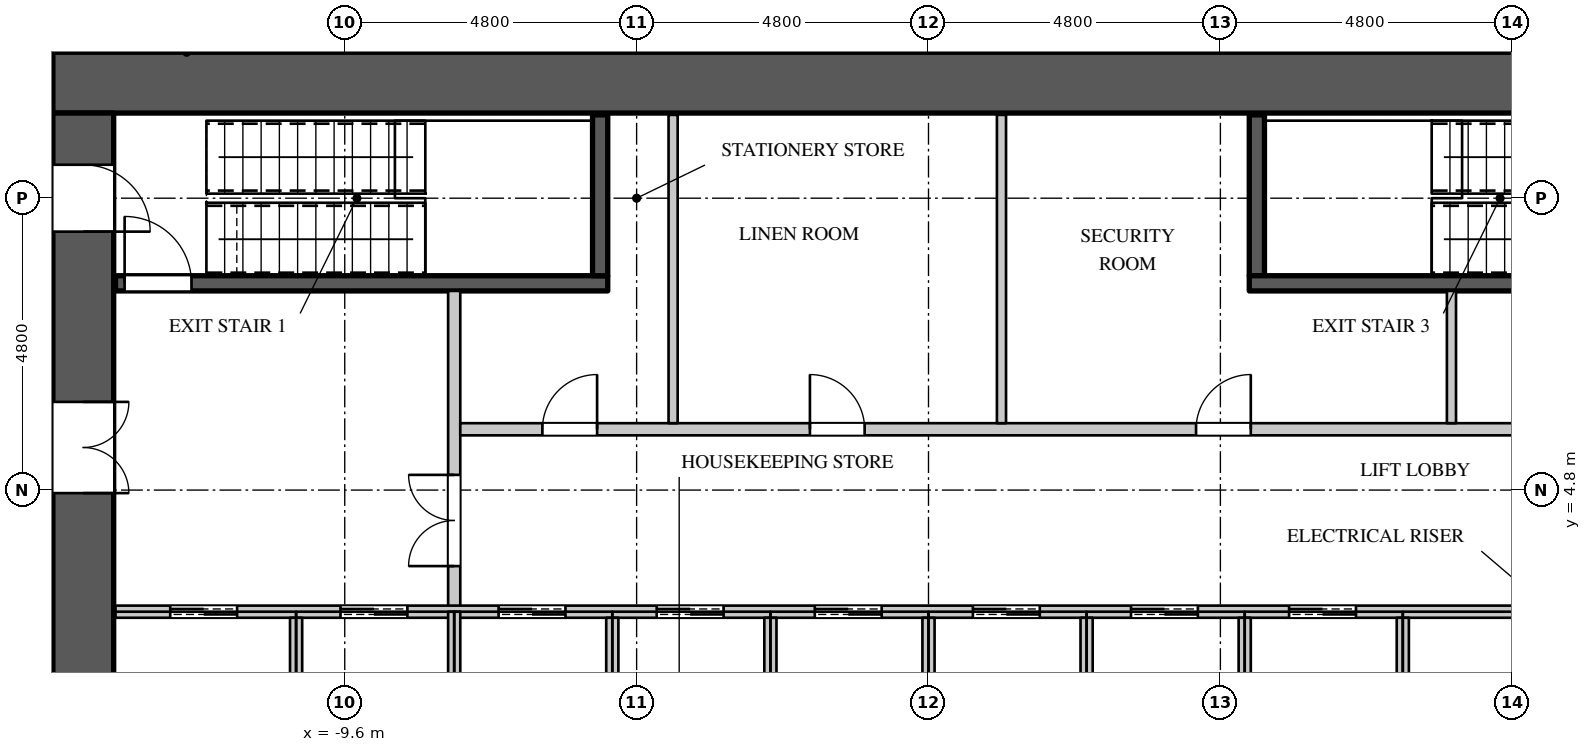
"""IFC4 building model, lengths in metres.
Left out: names, types, materials, properties, quantities, classifications, styles, units other than length and angle.
Written with IfcOpenShell. Run it as: python <this file> out.ifc"""

import sys

from ifc_helpers import new_model, si_unit, direction, frame, frame_2d, origin, place, context, subcontext, project, spatial, rectangle, extrude, element, fill, save


model = new_model("IFC4")
c1 = context("Model", 3, precision=1e-05, world=origin(), true_north=direction((0.0, 1.0)))
c2 = subcontext(c1, "Body", "Model", "MODEL_VIEW")
j1 = project(units=[si_unit("LENGTHUNIT", "METRE"), si_unit("PLANEANGLEUNIT", "RADIAN")], contexts=[c1])
p1 = place(None, origin())
s1 = spatial("IfcSite", under=j1, at=p1, CompositionType="ELEMENT")
p2 = place(p1, origin())
s2 = spatial("IfcBuilding", under=s1, at=p2, CompositionType="ELEMENT")
p3 = place(p2, frame((0.0, 0.0, 71.7)))
s3 = spatial("IfcBuildingStorey", under=s2, at=p3, CompositionType="ELEMENT", Elevation=71.7)
p4 = place(p3, frame((-14.4, 11.5, 0.0), z_axis=(0.0, 0.0, 1.0), x_axis=(1.0, 0.0, 0.0)))
e1 = element("IfcWall", 1, at=p4, inside=s3, PredefinedType="SHEAR", context=c2, shape_type="SweptSolid", body=[
    extrude(rectangle(XDim=28.8, YDim=1.0, at=frame_2d((14.4, 0.0))), origin(), (0.0, 0.0, 1.0), 4.2),
])
p5 = place(p3, frame((-13.9, -11.0, 0.0), z_axis=(0.0, 0.0, 1.0), x_axis=(0.0, 1.0, 0.0)))
e2 = element("IfcWall", 2, at=p5, inside=s3, PredefinedType="SHEAR", context=c2, shape_type="SweptSolid", body=[
    extrude(rectangle(XDim=22.0, YDim=1.0, at=frame_2d((11.0, 0.0))), origin(), (0.0, 0.0, 1.0), 4.2),
])
p6 = place(p5, frame((20.05, 0.0, 0.0)))
e3 = element("IfcOpeningElement", 3, at=p6, cuts=e2, PredefinedType="OPENING", context=c2, shape_type="SweptSolid", body=[
    extrude(rectangle(XDim=1.1, YDim=2.2, at=frame_2d((0.55, 1.1))), frame((0.0, 0.51, 0.0), z_axis=(0.0, -1.0, 0.0), x_axis=(1.0, 0.0, 0.0)), (0.0, 0.0, 1.0), 1.02),
])
p7 = place(p5, frame((0.85, 0.0, 0.0)))
e4 = element("IfcOpeningElement", 4, at=p7, cuts=e2, PredefinedType="OPENING", context=c2, shape_type="SweptSolid", body=[
    extrude(rectangle(XDim=1.1, YDim=2.2, at=frame_2d((0.55, 1.1))), frame((0.0, 0.51, 0.0), z_axis=(0.0, -1.0, 0.0), x_axis=(1.0, 0.0, 0.0)), (0.0, 0.0, 1.0), 1.02),
])
p8 = place(p5, frame((15.75, 0.0, 0.0)))
e5 = element("IfcOpeningElement", 5, at=p8, cuts=e2, PredefinedType="OPENING", context=c2, shape_type="SweptSolid", body=[
    extrude(rectangle(XDim=1.5, YDim=2.4, at=frame_2d((0.75, 1.2))), frame((0.0, 0.51, 0.0), z_axis=(0.0, -1.0, 0.0), x_axis=(1.0, 0.0, 0.0)), (0.0, 0.0, 1.0), 1.02),
])
p9 = place(p5, frame((4.75, 0.0, 0.0)))
e6 = element("IfcOpeningElement", 6, at=p9, cuts=e2, PredefinedType="OPENING", context=c2, shape_type="SweptSolid", body=[
    extrude(rectangle(XDim=1.5, YDim=2.4, at=frame_2d((0.75, 1.2))), frame((0.0, 0.51, 0.0), z_axis=(0.0, -1.0, 0.0), x_axis=(1.0, 0.0, 0.0)), (0.0, 0.0, 1.0), 1.02),
])
p10 = place(p3, frame((-7.8, 2.8, 0.0), z_axis=(0.0, 0.0, 1.0), x_axis=(0.0, 1.0, 0.0)))
e7 = element("IfcWall", 7, at=p10, inside=s3, PredefinedType="PARTITIONING", context=c2, shape_type="SweptSolid", body=[
    extrude(rectangle(XDim=5.275, YDim=0.2, at=frame_2d((2.637, 0.0))), origin(), (0.0, 0.0, 1.0), 3.95),
])
p11 = place(p10, frame((0.75, 0.0, 0.0)))
e8 = element("IfcOpeningElement", 8, at=p11, cuts=e7, PredefinedType="OPENING", context=c2, shape_type="SweptSolid", body=[
    extrude(rectangle(XDim=1.5, YDim=2.4, at=frame_2d((0.75, 1.2))), frame((0.0, 0.11, 0.0), z_axis=(0.0, -1.0, 0.0), x_axis=(1.0, 0.0, 0.0)), (0.0, 0.0, 1.0), 0.22),
])
p12 = place(p3, frame((-7.7, 5.8, 0.0), z_axis=(0.0, 0.0, 1.0), x_axis=(1.0, 0.0, 0.0)))
e9 = element("IfcWall", 9, at=p12, inside=s3, PredefinedType="PARTITIONING", context=c2, shape_type="SweptSolid", body=[
    extrude(rectangle(XDim=21.07, YDim=0.2, at=frame_2d((10.535, 0.0))), origin(), (0.0, 0.0, 1.0), 3.95),
])
p13 = place(p12, frame((1.35, 0.0, 0.0)))
e10 = element("IfcOpeningElement", 10, at=p13, cuts=e9, PredefinedType="OPENING", context=c2, shape_type="SweptSolid", body=[
    extrude(rectangle(XDim=0.9, YDim=2.2, at=frame_2d((0.45, 1.1))), frame((0.0, 0.11, 0.0), z_axis=(0.0, -1.0, 0.0), x_axis=(1.0, 0.0, 0.0)), (0.0, 0.0, 1.0), 0.22),
])
p14 = place(p12, frame((5.75, 0.0, 0.0)))
e11 = element("IfcOpeningElement", 11, at=p14, cuts=e9, PredefinedType="OPENING", context=c2, shape_type="SweptSolid", body=[
    extrude(rectangle(XDim=0.9, YDim=2.2, at=frame_2d((0.45, 1.1))), frame((0.0, 0.11, 0.0), z_axis=(0.0, -1.0, 0.0), x_axis=(1.0, 0.0, 0.0)), (0.0, 0.0, 1.0), 0.22),
])
p15 = place(p12, frame((12.1, 0.0, 0.0)))
e12 = element("IfcOpeningElement", 12, at=p15, cuts=e9, PredefinedType="OPENING", context=c2, shape_type="SweptSolid", body=[
    extrude(rectangle(XDim=0.9, YDim=2.2, at=frame_2d((0.45, 1.1))), frame((0.0, 0.11, 0.0), z_axis=(0.0, -1.0, 0.0), x_axis=(1.0, 0.0, 0.0)), (0.0, 0.0, 1.0), 0.22),
])
p16 = place(p12, frame((18.15, 0.0, 0.0)))
e13 = element("IfcOpeningElement", 13, at=p16, cuts=e9, PredefinedType="OPENING", context=c2, shape_type="SweptSolid", body=[
    extrude(rectangle(XDim=0.9, YDim=2.2, at=frame_2d((0.45, 1.1))), frame((0.0, 0.11, 0.0), z_axis=(0.0, -1.0, 0.0), x_axis=(1.0, 0.0, 0.0)), (0.0, 0.0, 1.0), 0.22),
])
for number, where, z_axis, x_axis in (
    (14, (-4.2, 5.9, 0.0), (0.0, 0.0, 1.0), (0.0, 1.0, 0.0)),
    (15, (1.2, 5.9, 0.0), (0.0, 0.0, 1.0), (0.0, 1.0, 0.0)),
):
    element("IfcWall", number, at=place(p3, frame(where, z_axis=z_axis, x_axis=x_axis)), inside=s3, PredefinedType="PARTITIONING", context=c2, shape_type="SweptSolid", body=[
        extrude(rectangle(XDim=5.07, YDim=0.15, at=frame_2d((2.535, 0.0))), origin(), (0.0, 0.0, 1.0), 3.95),
    ])
p17 = place(p3, frame((8.6, 5.9, 0.0), z_axis=(0.0, 0.0, 1.0), x_axis=(0.0, 1.0, 0.0)))
e16 = element("IfcWall", 16, at=p17, inside=s3, PredefinedType="PARTITIONING", context=c2, shape_type="SweptSolid", body=[
    extrude(rectangle(XDim=2.175, YDim=0.15, at=frame_2d((1.087, 0.0))), origin(), (0.0, 0.0, 1.0), 3.95),
])
p18 = place(p3, frame((-13.37, 2.8, 0.0), z_axis=(0.0, 0.0, 1.0), x_axis=(1.0, 0.0, 0.0)))
e17 = element("IfcWall", 17, at=p18, inside=s3, PredefinedType="PARTITIONING", context=c2, shape_type="SweptSolid", body=[
    extrude(rectangle(XDim=23.77, YDim=0.2, at=frame_2d((11.885, 0.0))), origin(), (0.0, 0.0, 1.0), 3.95),
])
p19 = place(p18, frame((0.9, 0.0, 0.0)))
e18 = element("IfcOpeningElement", 18, at=p19, cuts=e17, PredefinedType="OPENING", context=c2, shape_type="SweptSolid", body=[
    extrude(rectangle(XDim=1.1, YDim=2.2, at=frame_2d((0.55, 1.1))), frame((0.0, 0.11, 0.0), z_axis=(0.0, -1.0, 0.0), x_axis=(1.0, 0.0, 0.0)), (0.0, 0.0, 1.0), 0.22),
])
p20 = place(p18, frame((3.7, 0.0, 0.0)))
e19 = element("IfcOpeningElement", 19, at=p20, cuts=e17, PredefinedType="OPENING", context=c2, shape_type="SweptSolid", body=[
    extrude(rectangle(XDim=1.1, YDim=2.2, at=frame_2d((0.55, 1.1))), frame((0.0, 0.11, 0.0), z_axis=(0.0, -1.0, 0.0), x_axis=(1.0, 0.0, 0.0)), (0.0, 0.0, 1.0), 0.22),
])
p21 = place(p18, frame((6.3, 0.0, 0.0)))
e20 = element("IfcOpeningElement", 20, at=p21, cuts=e17, PredefinedType="OPENING", context=c2, shape_type="SweptSolid", body=[
    extrude(rectangle(XDim=1.1, YDim=2.2, at=frame_2d((0.55, 1.1))), frame((0.0, 0.11, 0.0), z_axis=(0.0, -1.0, 0.0), x_axis=(1.0, 0.0, 0.0)), (0.0, 0.0, 1.0), 0.22),
])
p22 = place(p18, frame((8.9, 0.0, 0.0)))
e21 = element("IfcOpeningElement", 21, at=p22, cuts=e17, PredefinedType="OPENING", context=c2, shape_type="SweptSolid", body=[
    extrude(rectangle(XDim=1.1, YDim=2.2, at=frame_2d((0.55, 1.1))), frame((0.0, 0.11, 0.0), z_axis=(0.0, -1.0, 0.0), x_axis=(1.0, 0.0, 0.0)), (0.0, 0.0, 1.0), 0.22),
])
p23 = place(p18, frame((11.5, 0.0, 0.0)))
e22 = element("IfcOpeningElement", 22, at=p23, cuts=e17, PredefinedType="OPENING", context=c2, shape_type="SweptSolid", body=[
    extrude(rectangle(XDim=1.1, YDim=2.2, at=frame_2d((0.55, 1.1))), frame((0.0, 0.11, 0.0), z_axis=(0.0, -1.0, 0.0), x_axis=(1.0, 0.0, 0.0)), (0.0, 0.0, 1.0), 0.22),
])
p24 = place(p18, frame((14.1, 0.0, 0.0)))
e23 = element("IfcOpeningElement", 23, at=p24, cuts=e17, PredefinedType="OPENING", context=c2, shape_type="SweptSolid", body=[
    extrude(rectangle(XDim=1.1, YDim=2.2, at=frame_2d((0.55, 1.1))), frame((0.0, 0.11, 0.0), z_axis=(0.0, -1.0, 0.0), x_axis=(1.0, 0.0, 0.0)), (0.0, 0.0, 1.0), 0.22),
])
p25 = place(p18, frame((16.7, 0.0, 0.0)))
e24 = element("IfcOpeningElement", 24, at=p25, cuts=e17, PredefinedType="OPENING", context=c2, shape_type="SweptSolid", body=[
    extrude(rectangle(XDim=1.1, YDim=2.2, at=frame_2d((0.55, 1.1))), frame((0.0, 0.11, 0.0), z_axis=(0.0, -1.0, 0.0), x_axis=(1.0, 0.0, 0.0)), (0.0, 0.0, 1.0), 0.22),
])
p26 = place(p18, frame((19.3, 0.0, 0.0)))
e25 = element("IfcOpeningElement", 25, at=p26, cuts=e17, PredefinedType="OPENING", context=c2, shape_type="SweptSolid", body=[
    extrude(rectangle(XDim=1.1, YDim=2.2, at=frame_2d((0.55, 1.1))), frame((0.0, 0.11, 0.0), z_axis=(0.0, -1.0, 0.0), x_axis=(1.0, 0.0, 0.0)), (0.0, 0.0, 1.0), 0.22),
])
p27 = place(p3, frame((-10.4, 0.0, 0.0), z_axis=(0.0, 0.0, 1.0), x_axis=(0.0, 1.0, 0.0)))
e26 = element("IfcWall", 26, at=p27, inside=s3, PredefinedType="PARTITIONING", context=c2, shape_type="SweptSolid", body=[
    extrude(rectangle(XDim=2.7, YDim=0.2, at=frame_2d((1.35, 0.0))), origin(), (0.0, 0.0, 1.0), 3.95),
])
p28 = place(p3, frame((-7.8, 0.0, 0.0), z_axis=(0.0, 0.0, 1.0), x_axis=(0.0, 1.0, 0.0)))
e27 = element("IfcWall", 27, at=p28, inside=s3, PredefinedType="PARTITIONING", context=c2, shape_type="SweptSolid", body=[
    extrude(rectangle(XDim=2.8, YDim=0.2, at=frame_2d((1.4, 0.0))), origin(), (0.0, 0.0, 1.0), 3.95),
])
for number, where, z_axis, x_axis in (
    (28, (-5.2, 0.1, 0.0), (0.0, 0.0, 1.0), (0.0, 1.0, 0.0)),
    (29, (-2.6, 0.1, 0.0), (0.0, 0.0, 1.0), (0.0, 1.0, 0.0)),
    (30, (0.0, 0.1, 0.0), (0.0, 0.0, 1.0), (0.0, 1.0, 0.0)),
    (31, (2.6, 0.1, 0.0), (0.0, 0.0, 1.0), (0.0, 1.0, 0.0)),
    (32, (5.2, 0.1, 0.0), (0.0, 0.0, 1.0), (0.0, 1.0, 0.0)),
):
    element("IfcWall", number, at=place(p3, frame(where, z_axis=z_axis, x_axis=x_axis)), inside=s3, PredefinedType="PARTITIONING", context=c2, shape_type="SweptSolid", body=[
        extrude(rectangle(XDim=2.6, YDim=0.2, at=frame_2d((1.3, 0.0))), origin(), (0.0, 0.0, 1.0), 3.95),
    ])
p29 = place(p3, frame((7.8, 0.0, 0.0), z_axis=(0.0, 0.0, 1.0), x_axis=(0.0, 1.0, 0.0)))
e33 = element("IfcWall", 33, at=p29, inside=s3, PredefinedType="PARTITIONING", context=c2, shape_type="SweptSolid", body=[
    extrude(rectangle(XDim=2.7, YDim=0.2, at=frame_2d((1.35, 0.0))), origin(), (0.0, 0.0, 1.0), 3.95),
])
p30 = place(p3, frame((-13.37, 8.2, 0.0), z_axis=(0.0, 0.0, 1.0), x_axis=(1.0, 0.0, 0.0)))
e34 = element("IfcWall", 34, at=p30, inside=s3, PredefinedType="SHEAR", context=c2, shape_type="SweptSolid", body=[
    extrude(rectangle(XDim=8.095, YDim=0.25, at=frame_2d((4.048, 0.0))), origin(), (0.0, 0.0, 1.0), 3.95),
])
p31 = place(p30, frame((0.15, 0.0, 0.0)))
e35 = element("IfcOpeningElement", 35, at=p31, cuts=e34, PredefinedType="OPENING", context=c2, shape_type="SweptSolid", body=[
    extrude(rectangle(XDim=1.1, YDim=2.2, at=frame_2d((0.55, 1.1))), frame((0.0, 0.135, 0.0), z_axis=(0.0, -1.0, 0.0), x_axis=(1.0, 0.0, 0.0)), (0.0, 0.0, 1.0), 0.27),
])
for number, where, z_axis, x_axis in (
    (36, (-5.4, 8.325, 0.0), (0.0, 0.0, 1.0), (0.0, 1.0, 0.0)),
    (37, (5.4, 8.325, 0.0), (0.0, 0.0, 1.0), (0.0, 1.0, 0.0)),
):
    element("IfcWall", number, at=place(p3, frame(where, z_axis=z_axis, x_axis=x_axis)), inside=s3, PredefinedType="SHEAR", context=c2, shape_type="SweptSolid", body=[
        extrude(rectangle(XDim=2.645, YDim=0.25, at=frame_2d((1.323, 0.0))), origin(), (0.0, 0.0, 1.0), 3.95),
    ])
p32 = place(p3, frame((5.275, 8.2, 0.0), z_axis=(0.0, 0.0, 1.0), x_axis=(1.0, 0.0, 0.0)))
e38 = element("IfcWall", 38, at=p32, inside=s3, PredefinedType="SHEAR", context=c2, shape_type="SweptSolid", body=[
    extrude(rectangle(XDim=8.095, YDim=0.25, at=frame_2d((4.048, 0.0))), origin(), (0.0, 0.0, 1.0), 3.95),
])
p33 = place(p13, origin())
e39 = element("IfcDoor", 39, at=p33, inside=s3, OperationType="SINGLE_SWING_RIGHT", PredefinedType="DOOR", context=c2, shape_type="SweptSolid", body=[
    extrude(rectangle(XDim=0.9, YDim=2.2, at=frame_2d((0.45, 1.1))), frame((0.0, 0.025, 0.0), z_axis=(0.0, -1.0, 0.0), x_axis=(1.0, 0.0, 0.0)), (0.0, 0.0, 1.0), 0.05),
])
fill(e10, e39)
p34 = place(p14, origin())
e40 = element("IfcDoor", 40, at=p34, inside=s3, OperationType="SINGLE_SWING_LEFT", PredefinedType="DOOR", context=c2, shape_type="SweptSolid", body=[
    extrude(rectangle(XDim=0.9, YDim=2.2, at=frame_2d((0.45, 1.1))), frame((0.0, 0.025, 0.0), z_axis=(0.0, -1.0, 0.0), x_axis=(1.0, 0.0, 0.0)), (0.0, 0.0, 1.0), 0.05),
])
fill(e11, e40)
p35 = place(p15, origin())
e41 = element("IfcDoor", 41, at=p35, inside=s3, OperationType="SINGLE_SWING_RIGHT", PredefinedType="DOOR", context=c2, shape_type="SweptSolid", body=[
    extrude(rectangle(XDim=0.9, YDim=2.2, at=frame_2d((0.45, 1.1))), frame((0.0, 0.025, 0.0), z_axis=(0.0, -1.0, 0.0), x_axis=(1.0, 0.0, 0.0)), (0.0, 0.0, 1.0), 0.05),
])
fill(e12, e41)
p36 = place(p19, origin())
e42 = element("IfcDoor", 42, at=p36, inside=s3, OperationType="DOUBLE_DOOR_SLIDING", PredefinedType="DOOR", context=c2, shape_type="SweptSolid", body=[
    extrude(rectangle(XDim=1.1, YDim=2.2, at=frame_2d((0.55, 1.1))), frame((0.0, 0.025, 0.0), z_axis=(0.0, -1.0, 0.0), x_axis=(1.0, 0.0, 0.0)), (0.0, 0.0, 1.0), 0.05),
])
fill(e18, e42)
p37 = place(p20, origin())
e43 = element("IfcDoor", 43, at=p37, inside=s3, OperationType="DOUBLE_DOOR_SLIDING", PredefinedType="DOOR", context=c2, shape_type="SweptSolid", body=[
    extrude(rectangle(XDim=1.1, YDim=2.2, at=frame_2d((0.55, 1.1))), frame((0.0, 0.025, 0.0), z_axis=(0.0, -1.0, 0.0), x_axis=(1.0, 0.0, 0.0)), (0.0, 0.0, 1.0), 0.05),
])
fill(e19, e43)
p38 = place(p21, origin())
e44 = element("IfcDoor", 44, at=p38, inside=s3, OperationType="DOUBLE_DOOR_SLIDING", PredefinedType="DOOR", context=c2, shape_type="SweptSolid", body=[
    extrude(rectangle(XDim=1.1, YDim=2.2, at=frame_2d((0.55, 1.1))), frame((0.0, 0.025, 0.0), z_axis=(0.0, -1.0, 0.0), x_axis=(1.0, 0.0, 0.0)), (0.0, 0.0, 1.0), 0.05),
])
fill(e20, e44)
p39 = place(p22, origin())
e45 = element("IfcDoor", 45, at=p39, inside=s3, OperationType="DOUBLE_DOOR_SLIDING", PredefinedType="DOOR", context=c2, shape_type="SweptSolid", body=[
    extrude(rectangle(XDim=1.1, YDim=2.2, at=frame_2d((0.55, 1.1))), frame((0.0, 0.025, 0.0), z_axis=(0.0, -1.0, 0.0), x_axis=(1.0, 0.0, 0.0)), (0.0, 0.0, 1.0), 0.05),
])
fill(e21, e45)
p40 = place(p23, origin())
e46 = element("IfcDoor", 46, at=p40, inside=s3, OperationType="DOUBLE_DOOR_SLIDING", PredefinedType="DOOR", context=c2, shape_type="SweptSolid", body=[
    extrude(rectangle(XDim=1.1, YDim=2.2, at=frame_2d((0.55, 1.1))), frame((0.0, 0.025, 0.0), z_axis=(0.0, -1.0, 0.0), x_axis=(1.0, 0.0, 0.0)), (0.0, 0.0, 1.0), 0.05),
])
fill(e22, e46)
p41 = place(p24, origin())
e47 = element("IfcDoor", 47, at=p41, inside=s3, OperationType="DOUBLE_DOOR_SLIDING", PredefinedType="DOOR", context=c2, shape_type="SweptSolid", body=[
    extrude(rectangle(XDim=1.1, YDim=2.2, at=frame_2d((0.55, 1.1))), frame((0.0, 0.025, 0.0), z_axis=(0.0, -1.0, 0.0), x_axis=(1.0, 0.0, 0.0)), (0.0, 0.0, 1.0), 0.05),
])
fill(e23, e47)
p42 = place(p25, origin())
e48 = element("IfcDoor", 48, at=p42, inside=s3, OperationType="DOUBLE_DOOR_SLIDING", PredefinedType="DOOR", context=c2, shape_type="SweptSolid", body=[
    extrude(rectangle(XDim=1.1, YDim=2.2, at=frame_2d((0.55, 1.1))), frame((0.0, 0.025, 0.0), z_axis=(0.0, -1.0, 0.0), x_axis=(1.0, 0.0, 0.0)), (0.0, 0.0, 1.0), 0.05),
])
fill(e24, e48)
p43 = place(p26, origin())
e49 = element("IfcDoor", 49, at=p43, inside=s3, OperationType="DOUBLE_DOOR_SLIDING", PredefinedType="DOOR", context=c2, shape_type="SweptSolid", body=[
    extrude(rectangle(XDim=1.1, YDim=2.2, at=frame_2d((0.55, 1.1))), frame((0.0, 0.025, 0.0), z_axis=(0.0, -1.0, 0.0), x_axis=(1.0, 0.0, 0.0)), (0.0, 0.0, 1.0), 0.05),
])
fill(e25, e49)
p44 = place(p31, origin())
e50 = element("IfcDoor", 50, at=p44, inside=s3, OperationType="SINGLE_SWING_LEFT", PredefinedType="DOOR", context=c2, shape_type="SweptSolid", body=[
    extrude(rectangle(XDim=1.1, YDim=2.2, at=frame_2d((0.55, 1.1))), frame((0.0, 0.025, 0.0), z_axis=(0.0, -1.0, 0.0), x_axis=(1.0, 0.0, 0.0)), (0.0, 0.0, 1.0), 0.05),
])
fill(e35, e50)
p45 = place(p11, origin())
e51 = element("IfcDoor", 51, at=p45, inside=s3, OperationType="DOUBLE_DOOR_SINGLE_SWING", PredefinedType="DOOR", context=c2, shape_type="SweptSolid", body=[
    extrude(rectangle(XDim=1.5, YDim=2.4, at=frame_2d((0.75, 1.2))), frame((0.0, 0.025, 0.0), z_axis=(0.0, -1.0, 0.0), x_axis=(1.0, 0.0, 0.0)), (0.0, 0.0, 1.0), 0.05),
])
fill(e8, e51)
p46 = place(p6, origin())
e52 = element("IfcDoor", 52, at=p46, inside=s3, OperationType="SINGLE_SWING_RIGHT", PredefinedType="DOOR", context=c2, shape_type="SweptSolid", body=[
    extrude(rectangle(XDim=1.1, YDim=2.2, at=frame_2d((0.55, 1.1))), frame((0.0, -0.445, 0.0), z_axis=(0.0, -1.0, 0.0), x_axis=(1.0, 0.0, 0.0)), (0.0, 0.0, 1.0), 0.05),
])
fill(e3, e52)
p47 = place(p8, origin())
e53 = element("IfcDoor", 53, at=p47, inside=s3, OperationType="DOUBLE_DOOR_SINGLE_SWING", PredefinedType="DOOR", context=c2, shape_type="SweptSolid", body=[
    extrude(rectangle(XDim=1.5, YDim=2.4, at=frame_2d((0.75, 1.2))), frame((0.0, -0.445, 0.0), z_axis=(0.0, -1.0, 0.0), x_axis=(1.0, 0.0, 0.0)), (0.0, 0.0, 1.0), 0.05),
])
fill(e5, e53)
save(model, sys.argv[1])
